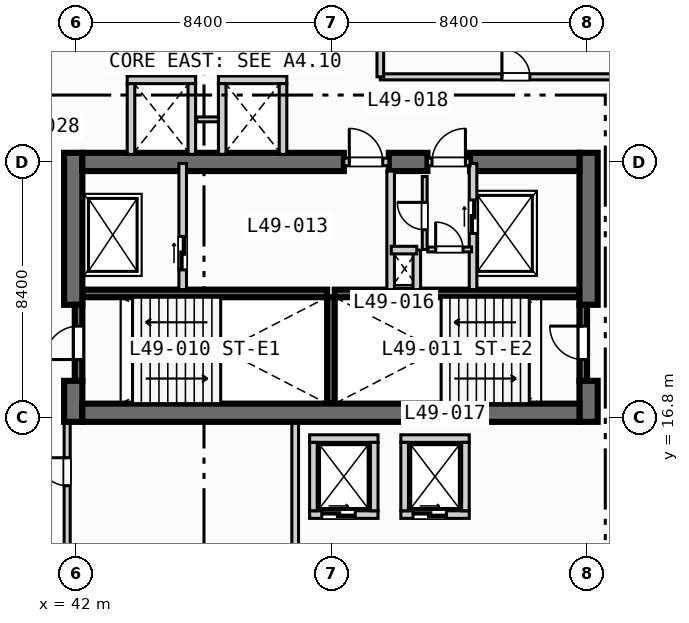
"""IFC4 building model, lengths in metres.
Left out: names, types, materials, properties, quantities, classifications, styles, units other than length and angle.
Written with IfcOpenShell. Run it as: python <this file> out.ifc"""

import sys

from ifc_helpers import new_model, si_unit, direction, frame, frame_2d, origin, place, context, subcontext, project, spatial, rectangle, extrude, element, fill, save


model = new_model("IFC4")
c1 = context("Model", 3, precision=1e-05, world=origin(), true_north=direction((0.0, 1.0)))
c2 = subcontext(c1, "Body", "Model", "MODEL_VIEW")
j1 = project(units=[si_unit("LENGTHUNIT", "METRE"), si_unit("PLANEANGLEUNIT", "RADIAN")], contexts=[c1])
p1 = place(None, origin())
s1 = spatial("IfcSite", under=j1, at=p1, CompositionType="ELEMENT")
p2 = place(p1, origin())
s2 = spatial("IfcBuilding", under=s1, at=p2, CompositionType="ELEMENT")
p3 = place(p2, frame((0.0, 0.0, 201.3)))
s3 = spatial("IfcBuildingStorey", under=s2, at=p3, CompositionType="ELEMENT", Elevation=201.3)
for number, where, z_axis, x_axis in (
    (1, (42.2, 20.875, 0.0), (0.0, 0.0, 1.0), (1.0, 0.0, 0.0)),
    (2, (50.5, 20.875, 0.0), (0.0, 0.0, 1.0), (1.0, 0.0, 0.0)),
):
    element("IfcWall", number, at=place(p3, frame(where, z_axis=z_axis, x_axis=x_axis)), inside=s3, PredefinedType="SOLIDWALL", context=c2, shape_type="SweptSolid", body=[
        extrude(rectangle(XDim=8.05, YDim=0.25, at=frame_2d((4.025, 0.0))), origin(), (0.0, 0.0, 1.0), 3.47),
    ])
p4 = place(p3, frame((50.375, 17.25, 0.0), z_axis=(0.0, 0.0, 1.0), x_axis=(0.0, 1.0, 0.0)))
e3 = element("IfcWall", 3, at=p4, inside=s3, PredefinedType="SOLIDWALL", context=c2, shape_type="SweptSolid", body=[
    extrude(rectangle(XDim=3.5, YDim=0.25, at=frame_2d((1.75, 0.0))), origin(), (0.0, 0.0, 1.0), 3.47),
])
p5 = place(p3, frame((41.9, 16.65, 0.0), z_axis=(0.0, 0.0, 1.0), x_axis=(0.0, 1.0, 0.0)))
e4 = element("IfcWall", 4, at=p5, inside=s3, PredefinedType="SHEAR", context=c2, shape_type="SweptSolid", body=[
    extrude(rectangle(XDim=1.35, YDim=0.6, at=frame_2d((0.675, 0.0))), origin(), (0.0, 0.0, 1.0), 3.47),
])
p6 = place(p3, frame((41.9, 20.5, 0.0), z_axis=(0.0, 0.0, 1.0), x_axis=(0.0, 1.0, 0.0)))
e5 = element("IfcWall", 5, at=p6, inside=s3, PredefinedType="SHEAR", context=c2, shape_type="SweptSolid", body=[
    extrude(rectangle(XDim=5.0, YDim=0.6, at=frame_2d((2.5, 0.0))), origin(), (0.0, 0.0, 1.0), 3.47),
])
p7 = place(p3, frame((58.85, 16.65, 0.0), z_axis=(0.0, 0.0, 1.0), x_axis=(0.0, 1.0, 0.0)))
e6 = element("IfcWall", 6, at=p7, inside=s3, PredefinedType="SHEAR", context=c2, shape_type="SweptSolid", body=[
    extrude(rectangle(XDim=1.35, YDim=0.6, at=frame_2d((0.675, 0.0))), origin(), (0.0, 0.0, 1.0), 3.47),
])
p8 = place(p3, frame((58.85, 20.5, 0.0), z_axis=(0.0, 0.0, 1.0), x_axis=(0.0, 1.0, 0.0)))
e7 = element("IfcWall", 7, at=p8, inside=s3, PredefinedType="SHEAR", context=c2, shape_type="SweptSolid", body=[
    extrude(rectangle(XDim=5.0, YDim=0.6, at=frame_2d((2.5, 0.0))), origin(), (0.0, 0.0, 1.0), 3.47),
])
p9 = place(p3, frame((42.2, 16.95, 0.0), z_axis=(0.0, 0.0, 1.0), x_axis=(1.0, 0.0, 0.0)))
e8 = element("IfcWall", 8, at=p9, inside=s3, PredefinedType="SHEAR", context=c2, shape_type="SweptSolid", body=[
    extrude(rectangle(XDim=16.35, YDim=0.6, at=frame_2d((8.175, 0.0))), origin(), (0.0, 0.0, 1.0), 3.47),
])
p10 = place(p3, frame((42.2, 25.2, 0.0), z_axis=(0.0, 0.0, 1.0), x_axis=(1.0, 0.0, 0.0)))
e9 = element("IfcWall", 9, at=p10, inside=s3, PredefinedType="SHEAR", context=c2, shape_type="SweptSolid", body=[
    extrude(rectangle(XDim=8.6, YDim=0.6, at=frame_2d((4.3, 0.0))), origin(), (0.0, 0.0, 1.0), 3.47),
])
p11 = place(p3, frame((52.28, 25.2, 0.0), z_axis=(0.0, 0.0, 1.0), x_axis=(1.0, 0.0, 0.0)))
e10 = element("IfcWall", 10, at=p11, inside=s3, PredefinedType="SHEAR", context=c2, shape_type="SweptSolid", body=[
    extrude(rectangle(XDim=1.27, YDim=0.6, at=frame_2d((0.635, 0.0))), origin(), (0.0, 0.0, 1.0), 3.47),
])
p12 = place(p3, frame((54.95, 25.2, 0.0), z_axis=(0.0, 0.0, 1.0), x_axis=(1.0, 0.0, 0.0)))
e11 = element("IfcWall", 11, at=p12, inside=s3, PredefinedType="SHEAR", context=c2, shape_type="SweptSolid", body=[
    extrude(rectangle(XDim=3.6, YDim=0.6, at=frame_2d((1.8, 0.0))), origin(), (0.0, 0.0, 1.0), 3.47),
])
p13 = place(p3, frame((42.075, 18.0, 0.0), z_axis=(0.0, 0.0, 1.0), x_axis=(0.0, 1.0, 0.0)))
e12 = element("IfcWall", 12, at=p13, inside=s3, PredefinedType="SOLIDWALL", context=c2, shape_type="SweptSolid", body=[
    extrude(rectangle(XDim=2.5, YDim=0.25, at=frame_2d((1.25, 0.0))), origin(), (0.0, 0.0, 1.0), 3.47),
])
p14 = place(p13, frame((0.7, 0.0, 0.0)))
e13 = element("IfcOpeningElement", 13, at=p14, cuts=e12, PredefinedType="OPENING", context=c2, shape_type="SweptSolid", body=[
    extrude(rectangle(XDim=1.1, YDim=2.15, at=frame_2d((0.55, 1.075))), frame((0.0, 0.135, 0.0), z_axis=(0.0, -1.0, 0.0), x_axis=(1.0, 0.0, 0.0)), (0.0, 0.0, 1.0), 0.27),
])
p15 = place(p3, frame((58.675, 18.0, 0.0), z_axis=(0.0, 0.0, 1.0), x_axis=(0.0, 1.0, 0.0)))
e14 = element("IfcWall", 14, at=p15, inside=s3, PredefinedType="SOLIDWALL", context=c2, shape_type="SweptSolid", body=[
    extrude(rectangle(XDim=2.5, YDim=0.25, at=frame_2d((1.25, 0.0))), origin(), (0.0, 0.0, 1.0), 3.47),
])
p16 = place(p15, frame((0.7, 0.0, 0.0)))
e15 = element("IfcOpeningElement", 15, at=p16, cuts=e14, PredefinedType="OPENING", context=c2, shape_type="SweptSolid", body=[
    extrude(rectangle(XDim=1.1, YDim=2.15, at=frame_2d((0.55, 1.075))), frame((0.0, 0.135, 0.0), z_axis=(0.0, -1.0, 0.0), x_axis=(1.0, 0.0, 0.0)), (0.0, 0.0, 1.0), 0.27),
])
p17 = place(p3, frame((45.5, 21.0, 0.0), z_axis=(0.0, 0.0, 1.0), x_axis=(0.0, 1.0, 0.0)))
e16 = element("IfcWall", 16, at=p17, inside=s3, PredefinedType="SOLIDWALL", context=c2, shape_type="SweptSolid", body=[
    extrude(rectangle(XDim=4.15, YDim=0.25, at=frame_2d((2.075, 0.0))), origin(), (0.0, 0.0, 1.0), 3.47),
])
p18 = place(p17, frame((0.65, 0.0, 0.0)))
e17 = element("IfcOpeningElement", 17, at=p18, cuts=e16, PredefinedType="OPENING", context=c2, shape_type="SweptSolid", body=[
    extrude(rectangle(XDim=1.1, YDim=2.15, at=frame_2d((0.55, 1.075))), frame((0.0, 0.135, 0.0), z_axis=(0.0, -1.0, 0.0), x_axis=(1.0, 0.0, 0.0)), (0.0, 0.0, 1.0), 0.27),
])
p19 = place(p3, frame((50.8, 25.2, 0.0), z_axis=(0.0, 0.0, 1.0), x_axis=(1.0, 0.0, 0.0)))
e18 = element("IfcWall", 18, at=p19, inside=s3, PredefinedType="SOLIDWALL", context=c2, shape_type="SweptSolid", body=[
    extrude(rectangle(XDim=1.48, YDim=0.25, at=frame_2d((0.74, 0.0))), origin(), (0.0, 0.0, 1.0), 3.47),
])
p20 = place(p19, frame((0.18, 0.0, 0.0)))
e19 = element("IfcOpeningElement", 19, at=p20, cuts=e18, PredefinedType="OPENING", context=c2, shape_type="SweptSolid", body=[
    extrude(rectangle(XDim=1.1, YDim=2.15, at=frame_2d((0.55, 1.075))), frame((0.0, 0.135, 0.0), z_axis=(0.0, -1.0, 0.0), x_axis=(1.0, 0.0, 0.0)), (0.0, 0.0, 1.0), 0.27),
])
p21 = place(p3, frame((52.34, 21.0, 0.0), z_axis=(0.0, 0.0, 1.0), x_axis=(0.0, 1.0, 0.0)))
e20 = element("IfcWall", 20, at=p21, inside=s3, PredefinedType="SOLIDWALL", context=c2, shape_type="SweptSolid", body=[
    extrude(rectangle(XDim=3.9, YDim=0.25, at=frame_2d((1.95, 0.0))), origin(), (0.0, 0.0, 1.0), 3.47),
])
p22 = place(p3, frame((55.05, 21.0, 0.0), z_axis=(0.0, 0.0, 1.0), x_axis=(0.0, 1.0, 0.0)))
e21 = element("IfcWall", 21, at=p22, inside=s3, PredefinedType="SOLIDWALL", context=c2, shape_type="SweptSolid", body=[
    extrude(rectangle(XDim=4.15, YDim=0.25, at=frame_2d((2.075, 0.0))), origin(), (0.0, 0.0, 1.0), 3.47),
])
p23 = place(p22, frame((1.85, 0.0, 0.0)))
e22 = element("IfcOpeningElement", 22, at=p23, cuts=e21, PredefinedType="OPENING", context=c2, shape_type="SweptSolid", body=[
    extrude(rectangle(XDim=1.1, YDim=2.15, at=frame_2d((0.55, 1.075))), frame((0.0, 0.135, 0.0), z_axis=(0.0, -1.0, 0.0), x_axis=(1.0, 0.0, 0.0)), (0.0, 0.0, 1.0), 0.27),
])
p24 = place(p3, frame((53.55, 25.2, 0.0), z_axis=(0.0, 0.0, 1.0), x_axis=(1.0, 0.0, 0.0)))
e23 = element("IfcWall", 23, at=p24, inside=s3, PredefinedType="SOLIDWALL", context=c2, shape_type="SweptSolid", body=[
    extrude(rectangle(XDim=1.4, YDim=0.25, at=frame_2d((0.7, 0.0))), origin(), (0.0, 0.0, 1.0), 3.47),
])
p25 = place(p24, frame((0.15, 0.0, 0.0)))
e24 = element("IfcOpeningElement", 24, at=p25, cuts=e23, PredefinedType="OPENING", context=c2, shape_type="SweptSolid", body=[
    extrude(rectangle(XDim=1.1, YDim=2.15, at=frame_2d((0.55, 1.075))), frame((0.0, 0.135, 0.0), z_axis=(0.0, -1.0, 0.0), x_axis=(1.0, 0.0, 0.0)), (0.0, 0.0, 1.0), 0.27),
])
p26 = place(p3, frame((53.2, 21.0, 0.0), z_axis=(0.0, 0.0, 1.0), x_axis=(0.0, 1.0, 0.0)))
e25 = element("IfcWall", 25, at=p26, inside=s3, PredefinedType="SOLIDWALL", context=c2, shape_type="SweptSolid", body=[
    extrude(rectangle(XDim=1.3, YDim=0.25, at=frame_2d((0.65, 0.0))), origin(), (0.0, 0.0, 1.0), 3.47),
])
p27 = place(p3, frame((52.36, 22.3, 0.0), z_axis=(0.0, 0.0, 1.0), x_axis=(1.0, 0.0, 0.0)))
e26 = element("IfcWall", 26, at=p27, inside=s3, PredefinedType="SOLIDWALL", context=c2, shape_type="SweptSolid", body=[
    extrude(rectangle(XDim=0.84, YDim=0.25, at=frame_2d((0.42, 0.0))), origin(), (0.0, 0.0, 1.0), 3.47),
])
p28 = place(p3, frame((53.56, 22.32, 0.0), z_axis=(0.0, 0.0, 1.0), x_axis=(1.0, 0.0, 0.0)))
e27 = element("IfcWall", 27, at=p28, inside=s3, PredefinedType="PARTITIONING", context=c2, shape_type="SweptSolid", body=[
    extrude(rectangle(XDim=1.44, YDim=0.16, at=frame_2d((0.72, 0.0))), origin(), (0.0, 0.0, 1.0), 3.47),
])
p29 = place(p28, frame((0.26, 0.0, 0.0)))
e28 = element("IfcOpeningElement", 28, at=p29, cuts=e27, PredefinedType="OPENING", context=c2, shape_type="SweptSolid", body=[
    extrude(rectangle(XDim=0.9, YDim=2.1, at=frame_2d((0.45, 1.05))), frame((0.0, 0.09, 0.0), z_axis=(0.0, -1.0, 0.0), x_axis=(1.0, 0.0, 0.0)), (0.0, 0.0, 1.0), 0.18),
])
p30 = place(p3, frame((53.46, 22.32, 0.0), z_axis=(0.0, 0.0, 1.0), x_axis=(0.0, 1.0, 0.0)))
e29 = element("IfcWall", 29, at=p30, inside=s3, PredefinedType="PARTITIONING", context=c2, shape_type="SweptSolid", body=[
    extrude(rectangle(XDim=2.4, YDim=0.16, at=frame_2d((1.2, 0.0))), origin(), (0.0, 0.0, 1.0), 3.47),
])
p31 = place(p30, frame((0.65, 0.0, 0.0)))
e30 = element("IfcOpeningElement", 30, at=p31, cuts=e29, PredefinedType="OPENING", context=c2, shape_type="SweptSolid", body=[
    extrude(rectangle(XDim=0.9, YDim=2.1, at=frame_2d((0.45, 1.05))), frame((0.0, 0.09, 0.0), z_axis=(0.0, -1.0, 0.0), x_axis=(1.0, 0.0, 0.0)), (0.0, 0.0, 1.0), 0.18),
])
p32 = place(p3, frame((49.675, 13.6, 0.0), z_axis=(0.0, 0.0, 1.0), x_axis=(1.0, 0.0, 0.0)))
e31 = element("IfcWall", 31, at=p32, inside=s3, PredefinedType="SOLIDWALL", context=c2, shape_type="SweptSolid", body=[
    extrude(rectangle(XDim=2.25, YDim=0.25, at=frame_2d((1.125, 0.0))), origin(), (0.0, 0.0, 1.0), 3.47),
])
p33 = place(p32, frame((0.4, 0.0, 0.0)))
e32 = element("IfcOpeningElement", 32, at=p33, cuts=e31, PredefinedType="OPENING", context=c2, shape_type="SweptSolid", body=[
    extrude(rectangle(XDim=1.1, YDim=2.15, at=frame_2d((0.55, 1.075))), frame((0.0, 0.135, 0.0), z_axis=(0.0, -1.0, 0.0), x_axis=(1.0, 0.0, 0.0)), (0.0, 0.0, 1.0), 0.27),
])
for number, where, z_axis, x_axis in (
    (33, (49.675, 16.1, 0.0), (0.0, 0.0, 1.0), (1.0, 0.0, 0.0)),
    (34, (49.8, 13.725, 0.0), (0.0, 0.0, 1.0), (0.0, 1.0, 0.0)),
    (35, (51.8, 13.725, 0.0), (0.0, 0.0, 1.0), (0.0, 1.0, 0.0)),
):
    element("IfcWall", number, at=place(p3, frame(where, z_axis=z_axis, x_axis=x_axis)), inside=s3, PredefinedType="SOLIDWALL", context=c2, shape_type="SweptSolid", body=[
        extrude(rectangle(XDim=2.25, YDim=0.25, at=frame_2d((1.125, 0.0))), origin(), (0.0, 0.0, 1.0), 3.47),
    ])
p34 = place(p3, frame((52.675, 13.6, 0.0), z_axis=(0.0, 0.0, 1.0), x_axis=(1.0, 0.0, 0.0)))
e36 = element("IfcWall", 36, at=p34, inside=s3, PredefinedType="SOLIDWALL", context=c2, shape_type="SweptSolid", body=[
    extrude(rectangle(XDim=2.25, YDim=0.25, at=frame_2d((1.125, 0.0))), origin(), (0.0, 0.0, 1.0), 3.47),
])
p35 = place(p34, frame((0.4, 0.0, 0.0)))
e37 = element("IfcOpeningElement", 37, at=p35, cuts=e36, PredefinedType="OPENING", context=c2, shape_type="SweptSolid", body=[
    extrude(rectangle(XDim=1.1, YDim=2.15, at=frame_2d((0.55, 1.075))), frame((0.0, 0.135, 0.0), z_axis=(0.0, -1.0, 0.0), x_axis=(1.0, 0.0, 0.0)), (0.0, 0.0, 1.0), 0.27),
])
for number, where, z_axis, x_axis in (
    (38, (52.675, 16.1, 0.0), (0.0, 0.0, 1.0), (1.0, 0.0, 0.0)),
    (39, (52.8, 13.725, 0.0), (0.0, 0.0, 1.0), (0.0, 1.0, 0.0)),
    (40, (54.8, 13.725, 0.0), (0.0, 0.0, 1.0), (0.0, 1.0, 0.0)),
    (41, (43.675, 27.9, 0.0), (0.0, 0.0, 1.0), (1.0, 0.0, 0.0)),
):
    element("IfcWall", number, at=place(p3, frame(where, z_axis=z_axis, x_axis=x_axis)), inside=s3, PredefinedType="SOLIDWALL", context=c2, shape_type="SweptSolid", body=[
        extrude(rectangle(XDim=2.25, YDim=0.25, at=frame_2d((1.125, 0.0))), origin(), (0.0, 0.0, 1.0), 3.47),
    ])
for number, where, z_axis, x_axis in (
    (42, (43.8, 25.45, 0.0), (0.0, 0.0, 1.0), (0.0, 1.0, 0.0)),
    (43, (45.8, 25.45, 0.0), (0.0, 0.0, 1.0), (0.0, 1.0, 0.0)),
):
    element("IfcWall", number, at=place(p3, frame(where, z_axis=z_axis, x_axis=x_axis)), inside=s3, PredefinedType="SOLIDWALL", context=c2, shape_type="SweptSolid", body=[
        extrude(rectangle(XDim=2.325, YDim=0.25, at=frame_2d((1.163, 0.0))), origin(), (0.0, 0.0, 1.0), 3.47),
    ])
p36 = place(p3, frame((45.96, 26.6, 0.0), z_axis=(0.0, 0.0, 1.0), x_axis=(1.0, 0.0, 0.0)))
e44 = element("IfcWall", 44, at=p36, inside=s3, PredefinedType="PARTITIONING", context=c2, shape_type="SweptSolid", body=[
    extrude(rectangle(XDim=0.88, YDim=0.16, at=frame_2d((0.44, 0.0))), origin(), (0.0, 0.0, 1.0), 3.47),
])
p37 = place(p3, frame((46.675, 27.9, 0.0), z_axis=(0.0, 0.0, 1.0), x_axis=(1.0, 0.0, 0.0)))
e45 = element("IfcWall", 45, at=p37, inside=s3, PredefinedType="SOLIDWALL", context=c2, shape_type="SweptSolid", body=[
    extrude(rectangle(XDim=2.25, YDim=0.25, at=frame_2d((1.125, 0.0))), origin(), (0.0, 0.0, 1.0), 3.47),
])
for number, where, z_axis, x_axis in (
    (46, (46.8, 25.45, 0.0), (0.0, 0.0, 1.0), (0.0, 1.0, 0.0)),
    (47, (48.8, 25.45, 0.0), (0.0, 0.0, 1.0), (0.0, 1.0, 0.0)),
):
    element("IfcWall", number, at=place(p3, frame(where, z_axis=z_axis, x_axis=x_axis)), inside=s3, PredefinedType="SOLIDWALL", context=c2, shape_type="SweptSolid", body=[
        extrude(rectangle(XDim=2.325, YDim=0.25, at=frame_2d((1.163, 0.0))), origin(), (0.0, 0.0, 1.0), 3.47),
    ])
p38 = place(p3, frame((41.7, 0.35, 0.0), z_axis=(0.0, 0.0, 1.0), x_axis=(0.0, 1.0, 0.0)))
e48 = element("IfcWall", 48, at=p38, inside=s3, PredefinedType="PARTITIONING", context=c2, shape_type="SweptSolid", body=[
    extrude(rectangle(XDim=16.25, YDim=0.2, at=frame_2d((8.125, 0.0))), origin(), (0.0, 0.0, 1.0), 2.82),
])
p39 = place(p38, frame((14.2, 0.0, 0.0)))
e49 = element("IfcOpeningElement", 49, at=p39, cuts=e48, PredefinedType="OPENING", context=c2, shape_type="SweptSolid", body=[
    extrude(rectangle(XDim=0.92, YDim=2.1, at=frame_2d((0.46, 1.05))), frame((0.0, 0.11, 0.0), z_axis=(0.0, -1.0, 0.0), x_axis=(1.0, 0.0, 0.0)), (0.0, 0.0, 1.0), 0.22),
])
p40 = place(p3, frame((49.2, 0.35, 0.0), z_axis=(0.0, 0.0, 1.0), x_axis=(0.0, 1.0, 0.0)))
e50 = element("IfcWall", 50, at=p40, inside=s3, PredefinedType="PARTITIONING", context=c2, shape_type="SweptSolid", body=[
    extrude(rectangle(XDim=16.25, YDim=0.22, at=frame_2d((8.125, 0.0))), origin(), (0.0, 0.0, 1.0), 3.47),
])
p41 = place(p3, frame((52.0, 28.0, 0.0), z_axis=(0.0, 0.0, 1.0), x_axis=(1.0, 0.0, 0.0)))
e51 = element("IfcWall", 51, at=p41, inside=s3, PredefinedType="PARTITIONING", context=c2, shape_type="SweptSolid", body=[
    extrude(rectangle(XDim=23.25, YDim=0.2, at=frame_2d((11.625, 0.0))), origin(), (0.0, 0.0, 1.0), 3.47),
])
p42 = place(p41, frame((4.0, 0.0, 0.0)))
e52 = element("IfcOpeningElement", 52, at=p42, cuts=e51, PredefinedType="OPENING", context=c2, shape_type="SweptSolid", body=[
    extrude(rectangle(XDim=0.92, YDim=2.1, at=frame_2d((0.46, 1.05))), frame((0.0, 0.11, 0.0), z_axis=(0.0, -1.0, 0.0), x_axis=(1.0, 0.0, 0.0)), (0.0, 0.0, 1.0), 0.22),
])
p43 = place(p3, frame((52.0, 28.0, 0.0), z_axis=(0.0, 0.0, 1.0), x_axis=(0.0, 1.0, 0.0)))
e53 = element("IfcWall", 53, at=p43, inside=s3, PredefinedType="PARTITIONING", context=c2, shape_type="SweptSolid", body=[
    extrude(rectangle(XDim=5.3, YDim=0.22, at=frame_2d((2.65, 0.0))), origin(), (0.0, 0.0, 1.0), 3.47),
])
p44 = place(p14, origin())
e54 = element("IfcDoor", 54, at=p44, inside=s3, OperationType="SINGLE_SWING_LEFT", PredefinedType="DOOR", context=c2, shape_type="SweptSolid", body=[
    extrude(rectangle(XDim=1.1, YDim=2.15, at=frame_2d((0.55, 1.075))), frame((0.0, 0.025, 0.0), z_axis=(0.0, -1.0, 0.0), x_axis=(1.0, 0.0, 0.0)), (0.0, 0.0, 1.0), 0.05),
])
fill(e13, e54)
p45 = place(p16, origin())
e55 = element("IfcDoor", 55, at=p45, inside=s3, OperationType="SINGLE_SWING_RIGHT", PredefinedType="DOOR", context=c2, shape_type="SweptSolid", body=[
    extrude(rectangle(XDim=1.1, YDim=2.15, at=frame_2d((0.55, 1.075))), frame((0.0, 0.025, 0.0), z_axis=(0.0, -1.0, 0.0), x_axis=(1.0, 0.0, 0.0)), (0.0, 0.0, 1.0), 0.05),
])
fill(e15, e55)
p46 = place(p18, origin())
e56 = element("IfcDoor", 56, at=p46, inside=s3, OperationType="SLIDING_TO_LEFT", PredefinedType="DOOR", context=c2, shape_type="SweptSolid", body=[
    extrude(rectangle(XDim=1.1, YDim=2.15, at=frame_2d((0.55, 1.075))), frame((0.0, 0.025, 0.0), z_axis=(0.0, -1.0, 0.0), x_axis=(1.0, 0.0, 0.0)), (0.0, 0.0, 1.0), 0.05),
])
fill(e17, e56)
p47 = place(p20, origin())
e57 = element("IfcDoor", 57, at=p47, inside=s3, OperationType="SINGLE_SWING_LEFT", PredefinedType="DOOR", context=c2, shape_type="SweptSolid", body=[
    extrude(rectangle(XDim=1.1, YDim=2.15, at=frame_2d((0.55, 1.075))), frame((0.0, 0.025, 0.0), z_axis=(0.0, -1.0, 0.0), x_axis=(1.0, 0.0, 0.0)), (0.0, 0.0, 1.0), 0.05),
])
fill(e19, e57)
p48 = place(p23, origin())
e58 = element("IfcDoor", 58, at=p48, inside=s3, OperationType="SLIDING_TO_LEFT", PredefinedType="DOOR", context=c2, shape_type="SweptSolid", body=[
    extrude(rectangle(XDim=1.1, YDim=2.15, at=frame_2d((0.55, 1.075))), frame((0.0, 0.025, 0.0), z_axis=(0.0, -1.0, 0.0), x_axis=(1.0, 0.0, 0.0)), (0.0, 0.0, 1.0), 0.05),
])
fill(e22, e58)
p49 = place(p25, origin())
e59 = element("IfcDoor", 59, at=p49, inside=s3, OperationType="SINGLE_SWING_RIGHT", PredefinedType="DOOR", context=c2, shape_type="SweptSolid", body=[
    extrude(rectangle(XDim=1.1, YDim=2.15, at=frame_2d((0.55, 1.075))), frame((0.0, 0.025, 0.0), z_axis=(0.0, -1.0, 0.0), x_axis=(1.0, 0.0, 0.0)), (0.0, 0.0, 1.0), 0.05),
])
fill(e24, e59)
p50 = place(p29, origin())
e60 = element("IfcDoor", 60, at=p50, inside=s3, OperationType="SINGLE_SWING_LEFT", PredefinedType="DOOR", context=c2, shape_type="SweptSolid", body=[
    extrude(rectangle(XDim=0.9, YDim=2.1, at=frame_2d((0.45, 1.05))), frame((0.0, 0.025, 0.0), z_axis=(0.0, -1.0, 0.0), x_axis=(1.0, 0.0, 0.0)), (0.0, 0.0, 1.0), 0.05),
])
fill(e28, e60)
p51 = place(p31, origin())
e61 = element("IfcDoor", 61, at=p51, inside=s3, OperationType="SINGLE_SWING_RIGHT", PredefinedType="DOOR", context=c2, shape_type="SweptSolid", body=[
    extrude(rectangle(XDim=0.9, YDim=2.1, at=frame_2d((0.45, 1.05))), frame((0.0, 0.025, 0.0), z_axis=(0.0, -1.0, 0.0), x_axis=(1.0, 0.0, 0.0)), (0.0, 0.0, 1.0), 0.05),
])
fill(e30, e61)
p52 = place(p33, origin())
e62 = element("IfcDoor", 62, at=p52, inside=s3, OperationType="SLIDING_TO_LEFT", PredefinedType="DOOR", context=c2, shape_type="SweptSolid", body=[
    extrude(rectangle(XDim=1.1, YDim=2.15, at=frame_2d((0.55, 1.075))), frame((0.0, 0.025, 0.0), z_axis=(0.0, -1.0, 0.0), x_axis=(1.0, 0.0, 0.0)), (0.0, 0.0, 1.0), 0.05),
])
fill(e32, e62)
p53 = place(p35, origin())
e63 = element("IfcDoor", 63, at=p53, inside=s3, OperationType="SLIDING_TO_LEFT", PredefinedType="DOOR", context=c2, shape_type="SweptSolid", body=[
    extrude(rectangle(XDim=1.1, YDim=2.15, at=frame_2d((0.55, 1.075))), frame((0.0, 0.025, 0.0), z_axis=(0.0, -1.0, 0.0), x_axis=(1.0, 0.0, 0.0)), (0.0, 0.0, 1.0), 0.05),
])
fill(e37, e63)
p54 = place(p39, origin())
e64 = element("IfcDoor", 64, at=p54, inside=s3, OperationType="SINGLE_SWING_RIGHT", PredefinedType="DOOR", context=c2, shape_type="SweptSolid", body=[
    extrude(rectangle(XDim=0.92, YDim=2.1, at=frame_2d((0.46, 1.05))), frame((0.0, 0.025, 0.0), z_axis=(0.0, -1.0, 0.0), x_axis=(1.0, 0.0, 0.0)), (0.0, 0.0, 1.0), 0.05),
])
fill(e49, e64)
p55 = place(p42, origin())
e65 = element("IfcDoor", 65, at=p55, inside=s3, OperationType="SINGLE_SWING_LEFT", PredefinedType="DOOR", context=c2, shape_type="SweptSolid", body=[
    extrude(rectangle(XDim=0.92, YDim=2.1, at=frame_2d((0.46, 1.05))), frame((0.0, 0.025, 0.0), z_axis=(0.0, -1.0, 0.0), x_axis=(1.0, 0.0, 0.0)), (0.0, 0.0, 1.0), 0.05),
])
fill(e52, e65)
save(model, sys.argv[1])
